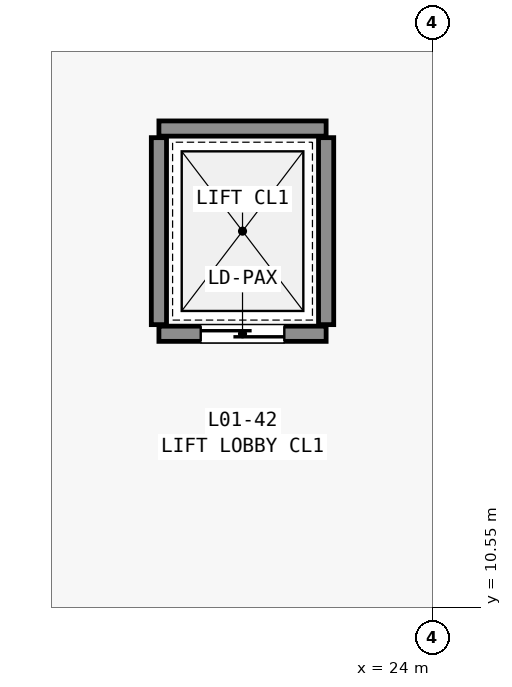
"""IFC4 building model, lengths in metres.
Left out: names, types, materials, properties, quantities, classifications, styles, units other than length and angle.
Written with IfcOpenShell. Run it as: python <this file> out.ifc"""

import sys

from ifc_helpers import new_model, si_unit, direction, frame, frame_2d, origin, place, context, subcontext, project, spatial, rectangle, extrude, element, fill, save


model = new_model("IFC4")
c1 = context("Model", 3, precision=1e-05, world=origin(), true_north=direction((0.0, 1.0)))
c2 = subcontext(c1, "Body", "Model", "MODEL_VIEW")
j1 = project(units=[si_unit("LENGTHUNIT", "METRE"), si_unit("PLANEANGLEUNIT", "RADIAN")], contexts=[c1])
p1 = place(None, origin())
s1 = spatial("IfcSite", under=j1, at=p1, CompositionType="ELEMENT")
p2 = place(p1, origin())
s2 = spatial("IfcBuilding", under=s1, at=p2, CompositionType="ELEMENT")
p3 = place(p2, frame((0.0, 0.0, 6.0)))
s3 = spatial("IfcBuildingStorey", under=s2, at=p3, CompositionType="ELEMENT", Elevation=6.0)
p4 = place(p3, frame((20.4, 14.15, 0.0), z_axis=(0.0, 0.0, 1.0), x_axis=(1.0, 0.0, 0.0)))
e1 = element("IfcWall", 1, at=p4, inside=s3, PredefinedType="STANDARD", context=c2, shape_type="SweptSolid", body=[
    extrude(rectangle(XDim=2.2, YDim=0.2, at=frame_2d((1.1, 0.0))), origin(), (0.0, 0.0, 1.0), 5.04),
])
p5 = place(p4, frame((0.55, 0.0, 0.0)))
e2 = element("IfcOpeningElement", 2, at=p5, cuts=e1, PredefinedType="OPENING", context=c2, shape_type="SweptSolid", body=[
    extrude(rectangle(XDim=1.1, YDim=2.15, at=frame_2d((0.55, 1.075))), frame((0.0, 0.11, 0.0), z_axis=(0.0, -1.0, 0.0), x_axis=(1.0, 0.0, 0.0)), (0.0, 0.0, 1.0), 0.22),
])
p6 = place(p3, frame((20.4, 16.85, 0.0), z_axis=(0.0, 0.0, 1.0), x_axis=(1.0, 0.0, 0.0)))
e3 = element("IfcWall", 3, at=p6, inside=s3, PredefinedType="STANDARD", context=c2, shape_type="SweptSolid", body=[
    extrude(rectangle(XDim=2.2, YDim=0.2, at=frame_2d((1.1, 0.0))), origin(), (0.0, 0.0, 1.0), 5.04),
])
for number, where, z_axis, x_axis in (
    (4, (20.4, 14.27, 0.0), (0.0, 0.0, 1.0), (0.0, 1.0, 0.0)),
    (5, (22.6, 14.27, 0.0), (0.0, 0.0, 1.0), (0.0, 1.0, 0.0)),
):
    element("IfcWall", number, at=place(p3, frame(where, z_axis=z_axis, x_axis=x_axis)), inside=s3, PredefinedType="STANDARD", context=c2, shape_type="SweptSolid", body=[
        extrude(rectangle(XDim=2.46, YDim=0.2, at=frame_2d((1.23, 0.0))), origin(), (0.0, 0.0, 1.0), 5.04),
    ])
p7 = place(p5, origin())
e6 = element("IfcDoor", 6, at=p7, inside=s3, OperationType="SLIDING_TO_LEFT", PredefinedType="DOOR", context=c2, shape_type="SweptSolid", body=[
    extrude(rectangle(XDim=1.1, YDim=2.15, at=frame_2d((0.55, 1.075))), frame((0.0, 0.025, 0.0), z_axis=(0.0, -1.0, 0.0), x_axis=(1.0, 0.0, 0.0)), (0.0, 0.0, 1.0), 0.05),
])
fill(e2, e6)
save(model, sys.argv[1])
